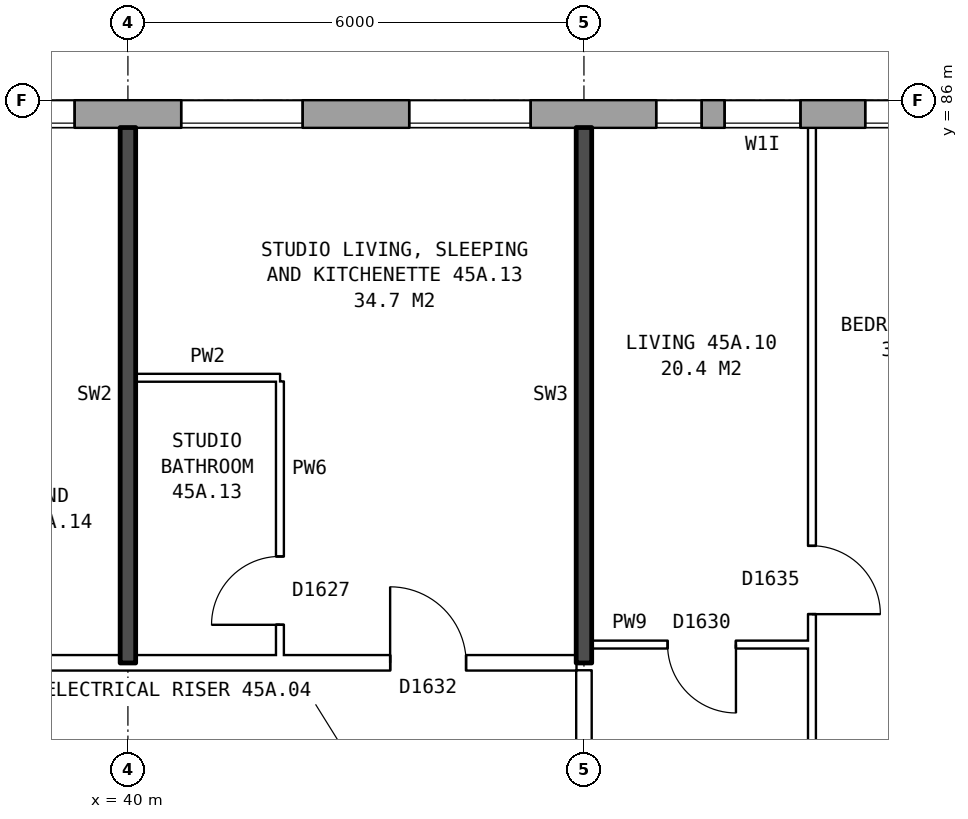
"""IFC4 building model, lengths in metres.
Left out: names, types, materials, properties, quantities, classifications, styles, units other than length and angle.
Written with IfcOpenShell. Run it as: python <this file> out.ifc"""

import sys

from ifc_helpers import new_model, si_unit, direction, frame, frame_2d, origin, place, context, subcontext, project, spatial, rectangle, extrude, element, fill, save


model = new_model("IFC4")
c1 = context("Model", 3, precision=1e-05, world=origin(), true_north=direction((0.0, 1.0)))
c2 = subcontext(c1, "Body", "Model", "MODEL_VIEW")
j1 = project(units=[si_unit("LENGTHUNIT", "METRE"), si_unit("PLANEANGLEUNIT", "RADIAN")], contexts=[c1])
p1 = place(None, origin())
s1 = spatial("IfcSite", under=j1, at=p1, CompositionType="ELEMENT")
p2 = place(p1, origin())
s2 = spatial("IfcBuilding", under=s1, at=p2, CompositionType="ELEMENT")
p3 = place(p2, frame((0.0, 0.0, 160.9)))
s3 = spatial("IfcBuildingStorey", under=s2, at=p3, CompositionType="ELEMENT", Elevation=160.9)
p4 = place(p3, frame((72.925, 85.82, 0.0), z_axis=(0.0, 0.0, 1.0), x_axis=(-1.0, 0.0, 0.0)))
e1 = element("IfcWall", 1, at=p4, inside=s3, PredefinedType="STANDARD", context=c2, shape_type="SweptSolid", body=[
    extrude(rectangle(XDim=41.351, YDim=0.36, at=frame_2d((20.675, 0.0))), origin(), (0.0, 0.0, 1.0), 2.85),
])
p5 = place(p4, frame((0.625, 0.0, 0.8)))
e2 = element("IfcOpeningElement", 2, at=p5, cuts=e1, PredefinedType="OPENING", context=c2, shape_type="SweptSolid", body=[
    extrude(rectangle(XDim=1.6, YDim=1.8, at=frame_2d((0.8, 0.9))), frame((0.0, 0.19, 0.0), z_axis=(0.0, -1.0, 0.0), x_axis=(1.0, 0.0, 0.0)), (0.0, 0.0, 1.0), 0.38),
])
p6 = place(p4, frame((3.625, 0.0, 0.8)))
e3 = element("IfcOpeningElement", 3, at=p6, cuts=e1, PredefinedType="OPENING", context=c2, shape_type="SweptSolid", body=[
    extrude(rectangle(XDim=1.6, YDim=1.8, at=frame_2d((0.8, 0.9))), frame((0.0, 0.19, 0.0), z_axis=(0.0, -1.0, 0.0), x_axis=(1.0, 0.0, 0.0)), (0.0, 0.0, 1.0), 0.38),
])
p7 = place(p4, frame((6.625, 0.0, 0.8)))
e4 = element("IfcOpeningElement", 4, at=p7, cuts=e1, PredefinedType="OPENING", context=c2, shape_type="SweptSolid", body=[
    extrude(rectangle(XDim=1.6, YDim=1.8, at=frame_2d((0.8, 0.9))), frame((0.0, 0.19, 0.0), z_axis=(0.0, -1.0, 0.0), x_axis=(1.0, 0.0, 0.0)), (0.0, 0.0, 1.0), 0.38),
])
p8 = place(p4, frame((9.625, 0.0, 0.8)))
e5 = element("IfcOpeningElement", 5, at=p8, cuts=e1, PredefinedType="OPENING", context=c2, shape_type="SweptSolid", body=[
    extrude(rectangle(XDim=1.6, YDim=1.8, at=frame_2d((0.8, 0.9))), frame((0.0, 0.19, 0.0), z_axis=(0.0, -1.0, 0.0), x_axis=(1.0, 0.0, 0.0)), (0.0, 0.0, 1.0), 0.38),
])
p9 = place(p4, frame((12.075, 0.0, 0.8)))
e6 = element("IfcOpeningElement", 6, at=p9, cuts=e1, PredefinedType="OPENING", context=c2, shape_type="SweptSolid", body=[
    extrude(rectangle(XDim=1.6, YDim=1.8, at=frame_2d((0.8, 0.9))), frame((0.0, 0.19, 0.0), z_axis=(0.0, -1.0, 0.0), x_axis=(1.0, 0.0, 0.0)), (0.0, 0.0, 1.0), 0.38),
])
p10 = place(p4, frame((15.375, 0.0, 0.25)))
e7 = element("IfcOpeningElement", 7, at=p10, cuts=e1, PredefinedType="OPENING", context=c2, shape_type="SweptSolid", body=[
    extrude(rectangle(XDim=0.8, YDim=0.9, at=frame_2d((0.4, 0.45))), frame((0.0, 0.19, 0.0), z_axis=(0.0, -1.0, 0.0), x_axis=(1.0, 0.0, 0.0)), (0.0, 0.0, 1.0), 0.38),
])
p11 = place(p4, frame((18.625, 0.0, 0.8)))
e8 = element("IfcOpeningElement", 8, at=p11, cuts=e1, PredefinedType="OPENING", context=c2, shape_type="SweptSolid", body=[
    extrude(rectangle(XDim=1.6, YDim=1.8, at=frame_2d((0.8, 0.9))), frame((0.0, 0.19, 0.0), z_axis=(0.0, -1.0, 0.0), x_axis=(1.0, 0.0, 0.0)), (0.0, 0.0, 1.0), 0.38),
])
p12 = place(p4, frame((21.625, 0.0, 0.8)))
e9 = element("IfcOpeningElement", 9, at=p12, cuts=e1, PredefinedType="OPENING", context=c2, shape_type="SweptSolid", body=[
    extrude(rectangle(XDim=1.6, YDim=1.8, at=frame_2d((0.8, 0.9))), frame((0.0, 0.19, 0.0), z_axis=(0.0, -1.0, 0.0), x_axis=(1.0, 0.0, 0.0)), (0.0, 0.0, 1.0), 0.38),
])
p13 = place(p4, frame((24.075, 0.0, 0.35)))
e10 = element("IfcOpeningElement", 10, at=p13, cuts=e1, PredefinedType="OPENING", context=c2, shape_type="SweptSolid", body=[
    extrude(rectangle(XDim=1.0, YDim=1.5, at=frame_2d((0.5, 0.75))), frame((0.0, 0.19, 0.0), z_axis=(0.0, -1.0, 0.0), x_axis=(1.0, 0.0, 0.0)), (0.0, 0.0, 1.0), 0.38),
])
p14 = place(p4, frame((27.625, 0.0, 0.8)))
e11 = element("IfcOpeningElement", 11, at=p14, cuts=e1, PredefinedType="OPENING", context=c2, shape_type="SweptSolid", body=[
    extrude(rectangle(XDim=1.6, YDim=1.8, at=frame_2d((0.8, 0.9))), frame((0.0, 0.19, 0.0), z_axis=(0.0, -1.0, 0.0), x_axis=(1.0, 0.0, 0.0)), (0.0, 0.0, 1.0), 0.38),
])
p15 = place(p4, frame((30.625, 0.0, 0.8)))
e12 = element("IfcOpeningElement", 12, at=p15, cuts=e1, PredefinedType="OPENING", context=c2, shape_type="SweptSolid", body=[
    extrude(rectangle(XDim=1.6, YDim=1.8, at=frame_2d((0.8, 0.9))), frame((0.0, 0.19, 0.0), z_axis=(0.0, -1.0, 0.0), x_axis=(1.0, 0.0, 0.0)), (0.0, 0.0, 1.0), 0.38),
])
p16 = place(p4, frame((33.625, 0.0, 0.8)))
e13 = element("IfcOpeningElement", 13, at=p16, cuts=e1, PredefinedType="OPENING", context=c2, shape_type="SweptSolid", body=[
    extrude(rectangle(XDim=1.6, YDim=1.8, at=frame_2d((0.8, 0.9))), frame((0.0, 0.19, 0.0), z_axis=(0.0, -1.0, 0.0), x_axis=(1.0, 0.0, 0.0)), (0.0, 0.0, 1.0), 0.38),
])
p17 = place(p4, frame((36.625, 0.0, 0.8)))
e14 = element("IfcOpeningElement", 14, at=p17, cuts=e1, PredefinedType="OPENING", context=c2, shape_type="SweptSolid", body=[
    extrude(rectangle(XDim=1.6, YDim=1.8, at=frame_2d((0.8, 0.9))), frame((0.0, 0.19, 0.0), z_axis=(0.0, -1.0, 0.0), x_axis=(1.0, 0.0, 0.0)), (0.0, 0.0, 1.0), 0.38),
])
p18 = place(p4, frame((13.975, 0.0, 1.5)))
e15 = element("IfcOpeningElement", 15, at=p18, cuts=e1, PredefinedType="OPENING", context=c2, shape_type="SweptSolid", body=[
    extrude(rectangle(XDim=0.6, YDim=0.9, at=frame_2d((0.3, 0.45))), frame((0.0, 0.19, 0.0), z_axis=(0.0, -1.0, 0.0), x_axis=(1.0, 0.0, 0.0)), (0.0, 0.0, 1.0), 0.38),
])
p19 = place(p4, frame((16.525, 0.0, 0.25)))
e16 = element("IfcOpeningElement", 16, at=p19, cuts=e1, PredefinedType="OPENING", context=c2, shape_type="SweptSolid", body=[
    extrude(rectangle(XDim=1.2, YDim=1.8, at=frame_2d((0.6, 0.9))), frame((0.0, 0.19, 0.0), z_axis=(0.0, -1.0, 0.0), x_axis=(1.0, 0.0, 0.0)), (0.0, 0.0, 1.0), 0.38),
])
p20 = place(p4, frame((25.375, 0.0, 0.25)))
e17 = element("IfcOpeningElement", 17, at=p20, cuts=e1, PredefinedType="OPENING", context=c2, shape_type="SweptSolid", body=[
    extrude(rectangle(XDim=0.6, YDim=0.9, at=frame_2d((0.3, 0.45))), frame((0.0, 0.19, 0.0), z_axis=(0.0, -1.0, 0.0), x_axis=(1.0, 0.0, 0.0)), (0.0, 0.0, 1.0), 0.38),
])
p21 = place(p3, frame((28.86, 78.6, 0.0), z_axis=(0.0, 0.0, 1.0), x_axis=(1.0, 0.0, 0.0)))
e18 = element("IfcWall", 18, at=p21, inside=s3, PredefinedType="PARTITIONING", context=c2, shape_type="SweptSolid", body=[
    extrude(rectangle(XDim=17.04, YDim=0.2, at=frame_2d((8.52, 0.0))), origin(), (0.0, 0.0, 1.0), 2.85),
])
p22 = place(p21, frame((14.59, 0.0, 0.0)))
e19 = element("IfcOpeningElement", 19, at=p22, cuts=e18, PredefinedType="OPENING", context=c2, shape_type="SweptSolid", body=[
    extrude(rectangle(XDim=1.0, YDim=2.1, at=frame_2d((0.5, 1.05))), frame((0.0, 0.11, 0.0), z_axis=(0.0, -1.0, 0.0), x_axis=(1.0, 0.0, 0.0)), (0.0, 0.0, 1.0), 0.22),
])
p23 = place(p21, frame((7.64, 0.0, 0.0)))
e20 = element("IfcOpeningElement", 20, at=p23, cuts=e18, PredefinedType="OPENING", context=c2, shape_type="SweptSolid", body=[
    extrude(rectangle(XDim=1.0, YDim=2.1, at=frame_2d((0.5, 1.05))), frame((0.0, 0.11, 0.0), z_axis=(0.0, -1.0, 0.0), x_axis=(1.0, 0.0, 0.0)), (0.0, 0.0, 1.0), 0.22),
])
p24 = place(p3, frame((46.1, 78.84, 0.0), z_axis=(0.0, 0.0, 1.0), x_axis=(1.0, 0.0, 0.0)))
e21 = element("IfcWall", 21, at=p24, inside=s3, PredefinedType="PARTITIONING", context=c2, shape_type="SweptSolid", body=[
    extrude(rectangle(XDim=2.9, YDim=0.1, at=frame_2d((1.45, 0.0))), origin(), (0.0, 0.0, 1.0), 2.85),
])
p25 = place(p24, frame((1.0, 0.0, 0.0)))
e22 = element("IfcOpeningElement", 22, at=p25, cuts=e21, PredefinedType="OPENING", context=c2, shape_type="SweptSolid", body=[
    extrude(rectangle(XDim=0.9, YDim=2.1, at=frame_2d((0.45, 1.05))), frame((0.0, 0.06, 0.0), z_axis=(0.0, -1.0, 0.0), x_axis=(1.0, 0.0, 0.0)), (0.0, 0.0, 1.0), 0.12),
])
p26 = place(p3, frame((40.1, 82.35, 0.0), z_axis=(0.0, 0.0, 1.0), x_axis=(1.0, 0.0, 0.0)))
e23 = element("IfcWall", 23, at=p26, inside=s3, PredefinedType="PARTITIONING", context=c2, shape_type="SweptSolid", body=[
    extrude(rectangle(XDim=1.9, YDim=0.1, at=frame_2d((0.95, 0.0))), origin(), (0.0, 0.0, 1.0), 2.85),
])
p27 = place(p3, frame((40.0, 78.6, 0.0), z_axis=(0.0, 0.0, 1.0), x_axis=(0.0, 1.0, 0.0)))
e24 = element("IfcWall", 24, at=p27, inside=s3, PredefinedType="SOLIDWALL", context=c2, shape_type="SweptSolid", body=[
    extrude(rectangle(XDim=7.04, YDim=0.2, at=frame_2d((3.52, 0.0))), origin(), (0.0, 0.0, 1.0), 2.85),
])
p28 = place(p3, frame((42.0, 78.7, 0.0), z_axis=(0.0, 0.0, 1.0), x_axis=(0.0, 1.0, 0.0)))
e25 = element("IfcWall", 25, at=p28, inside=s3, PredefinedType="PARTITIONING", context=c2, shape_type="SweptSolid", body=[
    extrude(rectangle(XDim=3.6, YDim=0.1, at=frame_2d((1.8, 0.0))), origin(), (0.0, 0.0, 1.0), 2.85),
])
p29 = place(p28, frame((0.4, 0.0, 0.0)))
e26 = element("IfcOpeningElement", 26, at=p29, cuts=e25, PredefinedType="OPENING", context=c2, shape_type="SweptSolid", body=[
    extrude(rectangle(XDim=0.9, YDim=2.1, at=frame_2d((0.45, 1.05))), frame((0.0, 0.06, 0.0), z_axis=(0.0, -1.0, 0.0), x_axis=(1.0, 0.0, 0.0)), (0.0, 0.0, 1.0), 0.12),
])
p30 = place(p3, frame((46.0, 76.3, 0.0), z_axis=(0.0, 0.0, 1.0), x_axis=(0.0, 1.0, 0.0)))
e27 = element("IfcWall", 27, at=p30, inside=s3, PredefinedType="PARTITIONING", context=c2, shape_type="SweptSolid", body=[
    extrude(rectangle(XDim=2.2, YDim=0.2, at=frame_2d((1.1, 0.0))), origin(), (0.0, 0.0, 1.0), 2.85),
])
p31 = place(p3, frame((46.0, 78.6, 0.0), z_axis=(0.0, 0.0, 1.0), x_axis=(0.0, 1.0, 0.0)))
e28 = element("IfcWall", 28, at=p31, inside=s3, PredefinedType="SOLIDWALL", context=c2, shape_type="SweptSolid", body=[
    extrude(rectangle(XDim=7.04, YDim=0.2, at=frame_2d((3.52, 0.0))), origin(), (0.0, 0.0, 1.0), 2.85),
])
p32 = place(p3, frame((49.0, 71.3, 0.0), z_axis=(0.0, 0.0, 1.0), x_axis=(0.0, 1.0, 0.0)))
e29 = element("IfcWall", 29, at=p32, inside=s3, PredefinedType="PARTITIONING", context=c2, shape_type="SweptSolid", body=[
    extrude(rectangle(XDim=14.34, YDim=0.1, at=frame_2d((7.17, 0.0))), origin(), (0.0, 0.0, 1.0), 2.85),
])
p33 = place(p32, frame((7.94, 0.0, 0.0)))
e30 = element("IfcOpeningElement", 30, at=p33, cuts=e29, PredefinedType="OPENING", context=c2, shape_type="SweptSolid", body=[
    extrude(rectangle(XDim=0.9, YDim=2.1, at=frame_2d((0.45, 1.05))), frame((0.0, 0.06, 0.0), z_axis=(0.0, -1.0, 0.0), x_axis=(1.0, 0.0, 0.0)), (0.0, 0.0, 1.0), 0.12),
])
p34 = place(p32, frame((0.4, 0.0, 0.0)))
e31 = element("IfcOpeningElement", 31, at=p34, cuts=e29, PredefinedType="OPENING", context=c2, shape_type="SweptSolid", body=[
    extrude(rectangle(XDim=0.9, YDim=2.1, at=frame_2d((0.45, 1.05))), frame((0.0, 0.06, 0.0), z_axis=(0.0, -1.0, 0.0), x_axis=(1.0, 0.0, 0.0)), (0.0, 0.0, 1.0), 0.12),
])
p35 = place(p12, origin())
e32 = element("IfcWindow", 32, at=p35, inside=s3, PartitioningType="SINGLE_PANEL", PredefinedType="WINDOW", context=c2, shape_type="SweptSolid", body=[
    extrude(rectangle(XDim=1.6, YDim=1.8, at=frame_2d((0.8, 0.9))), frame((0.0, 0.15, 0.0), z_axis=(0.0, -1.0, 0.0), x_axis=(1.0, 0.0, 0.0)), (0.0, 0.0, 1.0), 0.06),
])
fill(e9, e32)
p36 = place(p13, origin())
e33 = element("IfcWindow", 33, at=p36, inside=s3, PartitioningType="SINGLE_PANEL", PredefinedType="WINDOW", context=c2, shape_type="SweptSolid", body=[
    extrude(rectangle(XDim=1.0, YDim=1.5, at=frame_2d((0.5, 0.75))), frame((0.0, 0.15, 0.0), z_axis=(0.0, -1.0, 0.0), x_axis=(1.0, 0.0, 0.0)), (0.0, 0.0, 1.0), 0.06),
])
fill(e10, e33)
p37 = place(p14, origin())
e34 = element("IfcWindow", 34, at=p37, inside=s3, PartitioningType="SINGLE_PANEL", PredefinedType="WINDOW", context=c2, shape_type="SweptSolid", body=[
    extrude(rectangle(XDim=1.6, YDim=1.8, at=frame_2d((0.8, 0.9))), frame((0.0, 0.15, 0.0), z_axis=(0.0, -1.0, 0.0), x_axis=(1.0, 0.0, 0.0)), (0.0, 0.0, 1.0), 0.06),
])
fill(e11, e34)
p38 = place(p15, origin())
e35 = element("IfcWindow", 35, at=p38, inside=s3, PartitioningType="SINGLE_PANEL", PredefinedType="WINDOW", context=c2, shape_type="SweptSolid", body=[
    extrude(rectangle(XDim=1.6, YDim=1.8, at=frame_2d((0.8, 0.9))), frame((0.0, 0.15, 0.0), z_axis=(0.0, -1.0, 0.0), x_axis=(1.0, 0.0, 0.0)), (0.0, 0.0, 1.0), 0.06),
])
fill(e12, e35)
p39 = place(p16, origin())
e36 = element("IfcWindow", 36, at=p39, inside=s3, PartitioningType="SINGLE_PANEL", PredefinedType="WINDOW", context=c2, shape_type="SweptSolid", body=[
    extrude(rectangle(XDim=1.6, YDim=1.8, at=frame_2d((0.8, 0.9))), frame((0.0, 0.15, 0.0), z_axis=(0.0, -1.0, 0.0), x_axis=(1.0, 0.0, 0.0)), (0.0, 0.0, 1.0), 0.06),
])
fill(e13, e36)
p40 = place(p33, frame((0.9, 0.0, 0.0), z_axis=(0.0, 0.0, 1.0), x_axis=(-1.0, 0.0, 0.0)))
e37 = element("IfcDoor", 37, at=p40, inside=s3, OperationType="SINGLE_SWING_RIGHT", PredefinedType="DOOR", context=c2, shape_type="SweptSolid", body=[
    extrude(rectangle(XDim=0.9, YDim=2.1, at=frame_2d((0.45, 1.05))), frame((0.0, 0.025, 0.0), z_axis=(0.0, -1.0, 0.0), x_axis=(1.0, 0.0, 0.0)), (0.0, 0.0, 1.0), 0.05),
])
fill(e30, e37)
p41 = place(p25, frame((0.9, 0.0, 0.0), z_axis=(0.0, 0.0, 1.0), x_axis=(-1.0, 0.0, 0.0)))
e38 = element("IfcDoor", 38, at=p41, inside=s3, OperationType="SINGLE_SWING_LEFT", PredefinedType="DOOR", context=c2, shape_type="SweptSolid", body=[
    extrude(rectangle(XDim=0.9, YDim=2.1, at=frame_2d((0.45, 1.05))), frame((0.0, 0.025, 0.0), z_axis=(0.0, -1.0, 0.0), x_axis=(1.0, 0.0, 0.0)), (0.0, 0.0, 1.0), 0.05),
])
fill(e22, e38)
p42 = place(p22, origin())
e39 = element("IfcDoor", 39, at=p42, inside=s3, OperationType="SINGLE_SWING_LEFT", PredefinedType="DOOR", context=c2, shape_type="SweptSolid", body=[
    extrude(rectangle(XDim=1.0, YDim=2.1, at=frame_2d((0.5, 1.05))), frame((0.0, 0.025, 0.0), z_axis=(0.0, -1.0, 0.0), x_axis=(1.0, 0.0, 0.0)), (0.0, 0.0, 1.0), 0.05),
])
fill(e19, e39)
p43 = place(p29, origin())
e40 = element("IfcDoor", 40, at=p43, inside=s3, OperationType="SINGLE_SWING_LEFT", PredefinedType="DOOR", context=c2, shape_type="SweptSolid", body=[
    extrude(rectangle(XDim=0.9, YDim=2.1, at=frame_2d((0.45, 1.05))), frame((0.0, 0.025, 0.0), z_axis=(0.0, -1.0, 0.0), x_axis=(1.0, 0.0, 0.0)), (0.0, 0.0, 1.0), 0.05),
])
fill(e26, e40)
p44 = place(p20, origin())
e41 = element("IfcWindow", 41, at=p44, inside=s3, PartitioningType="SINGLE_PANEL", PredefinedType="WINDOW", context=c2, shape_type="SweptSolid", body=[
    extrude(rectangle(XDim=0.6, YDim=0.9, at=frame_2d((0.3, 0.45))), frame((0.0, 0.15, 0.0), z_axis=(0.0, -1.0, 0.0), x_axis=(1.0, 0.0, 0.0)), (0.0, 0.0, 1.0), 0.06),
])
fill(e17, e41)
save(model, sys.argv[1])
